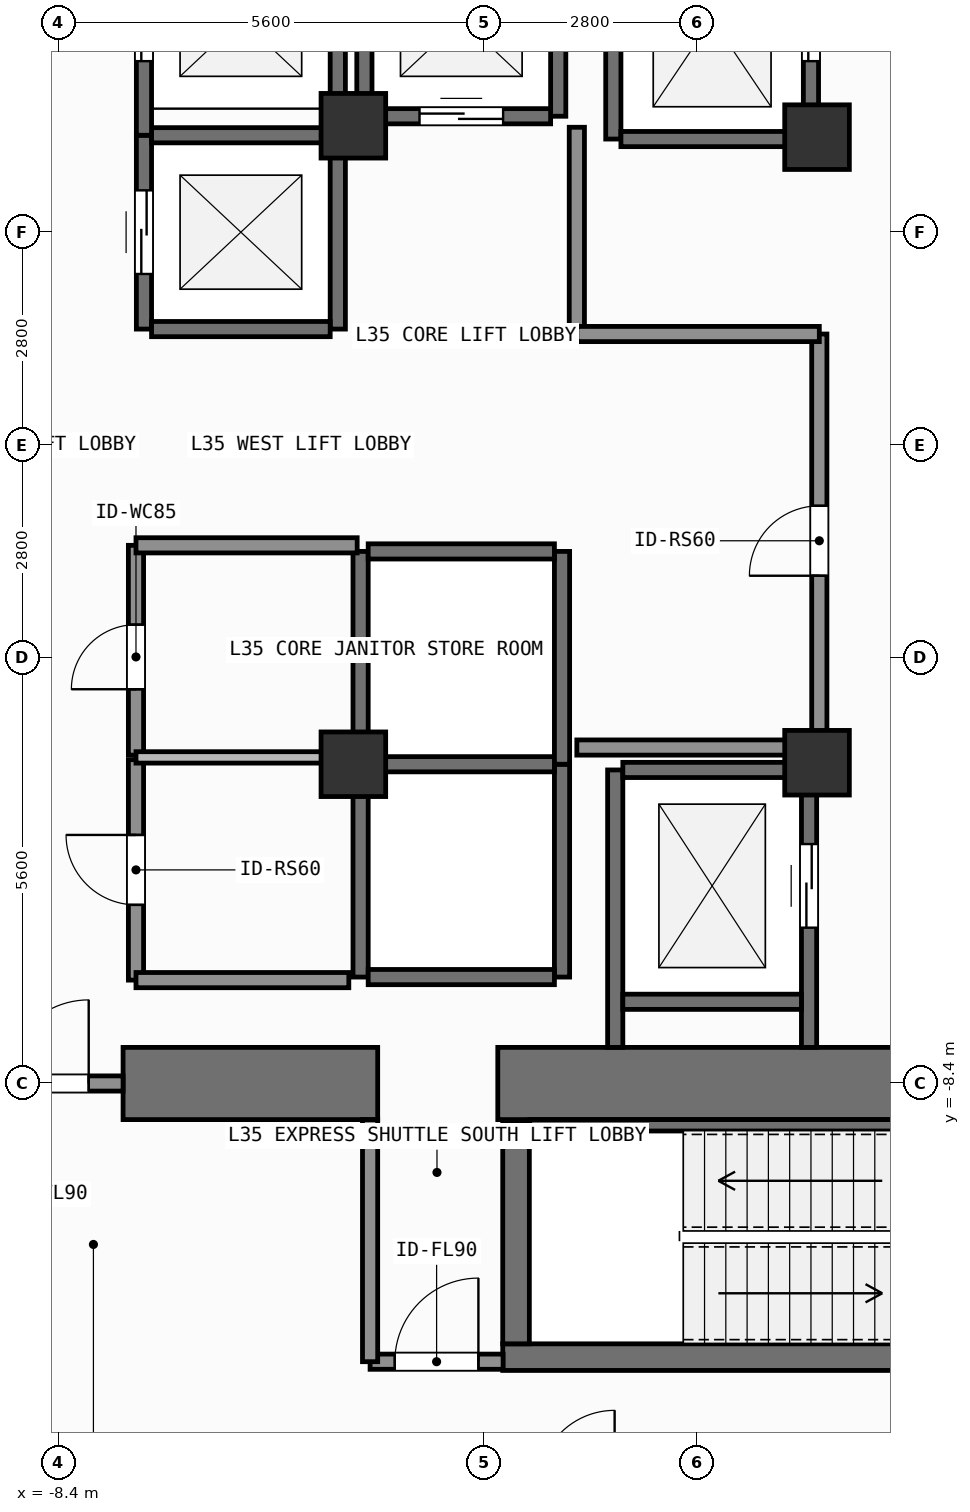
"""IFC4 building model, lengths in metres.
Left out: names, types, materials, properties, quantities, classifications, styles, units other than length and angle.
Written with IfcOpenShell. Run it as: python <this file> out.ifc"""

import sys

from ifc_helpers import new_model, si_unit, direction, frame, frame_2d, origin, origin_2d, place, context, subcontext, project, spatial, rectangle, extrude, element, fill, save


model = new_model("IFC4")
c1 = context("Model", 3, precision=1e-05, world=origin(), true_north=direction((0.0, 1.0)))
c2 = subcontext(c1, "Body", "Model", "MODEL_VIEW")
j1 = project(units=[si_unit("LENGTHUNIT", "METRE"), si_unit("PLANEANGLEUNIT", "RADIAN")], contexts=[c1])
p1 = place(None, origin())
s1 = spatial("IfcSite", under=j1, at=p1, CompositionType="ELEMENT")
p2 = place(p1, origin())
s2 = spatial("IfcBuilding", under=s1, at=p2, CompositionType="ELEMENT")
p3 = place(p2, frame((0.0, 0.0, 140.7)))
s3 = spatial("IfcBuildingStorey", under=s2, at=p3, CompositionType="ELEMENT", Elevation=140.7)
p4 = place(p3, frame((-7.55, -8.4, 0.0), z_axis=(0.0, 0.0, 1.0), x_axis=(1.0, 0.0, 0.0)))
e1 = element("IfcWall", 1, at=p4, inside=s3, PredefinedType="SHEAR", context=c2, shape_type="SweptSolid", body=[
    extrude(rectangle(XDim=3.35, YDim=0.95, at=frame_2d((1.675, 0.0))), origin(), (0.0, 0.0, 1.0), 3.9),
])
p5 = place(p3, frame((-2.62, -8.4, 0.0), z_axis=(0.0, 0.0, 1.0), x_axis=(1.0, 0.0, 0.0)))
e2 = element("IfcWall", 2, at=p5, inside=s3, PredefinedType="SHEAR", context=c2, shape_type="SweptSolid", body=[
    extrude(rectangle(XDim=7.27, YDim=0.95, at=frame_2d((3.635, 0.0))), origin(), (0.0, 0.0, 1.0), 3.9),
])
p6 = place(p3, frame((-2.555, -12.0, 0.0), z_axis=(0.0, 0.0, 1.0), x_axis=(1.0, 0.0, 0.0)))
e3 = element("IfcWall", 3, at=p6, inside=s3, PredefinedType="SHEAR", context=c2, shape_type="SweptSolid", body=[
    extrude(rectangle(XDim=7.31, YDim=0.35, at=frame_2d((3.655, 0.0))), origin(), (0.0, 0.0, 1.0), 3.9),
])
p7 = place(p3, frame((-2.2, -8.95, 0.0), z_axis=(0.0, 0.0, 1.0), x_axis=(1.0, 0.0, 0.0)))
e4 = element("IfcWall", 4, at=p7, inside=s3, PredefinedType="SHEAR", context=c2, shape_type="SweptSolid", body=[
    extrude(rectangle(XDim=6.6, YDim=0.15, at=frame_2d((3.3, 0.0))), origin(), (0.0, 0.0, 1.0), 3.9),
])
p8 = place(p3, frame((-2.38, -11.825, 0.0), z_axis=(0.0, 0.0, 1.0), x_axis=(0.0, 1.0, 0.0)))
e5 = element("IfcWall", 5, at=p8, inside=s3, PredefinedType="SHEAR", context=c2, shape_type="SweptSolid", body=[
    extrude(rectangle(XDim=2.925, YDim=0.35, at=frame_2d((1.462, 0.0))), origin(), (0.0, 0.0, 1.0), 3.9),
])
for number, where, z_axis, x_axis in (
    (6, (-4.52, -4.2, 0.0), (0.0, 0.0, 1.0), (1.0, 0.0, 0.0)),
    (7, (1.58, -4.18, 0.0), (0.0, 0.0, 1.0), (1.0, 0.0, 0.0)),
    (8, (1.58, 4.05, 0.0), (0.0, 0.0, 1.0), (1.0, 0.0, 0.0)),
    (9, (-4.52, 4.2, 0.0), (0.0, 0.0, 1.0), (1.0, 0.0, 0.0)),
):
    element("IfcColumn", number, at=place(p3, frame(where, z_axis=z_axis, x_axis=x_axis)), inside=s3, PredefinedType="COLUMN", context=c2, shape_type="SweptSolid", body=[
        extrude(rectangle(XDim=0.85, YDim=0.85, at=origin_2d()), origin(), (0.0, 0.0, 1.0), 3.9),
    ])
p9 = place(p3, frame((-7.275, 1.525, 0.0), z_axis=(0.0, 0.0, 1.0), x_axis=(0.0, 1.0, 0.0)))
e10 = element("IfcWall", 10, at=p9, inside=s3, PredefinedType="SHEAR", context=c2, shape_type="SweptSolid", body=[
    extrude(rectangle(XDim=2.55, YDim=0.2, at=frame_2d((1.275, 0.0))), origin(), (0.0, 0.0, 1.0), 3.68),
])
p10 = place(p9, frame((0.725, 0.0, 0.0)))
e11 = element("IfcOpeningElement", 11, at=p10, cuts=e10, PredefinedType="OPENING", context=c2, shape_type="SweptSolid", body=[
    extrude(rectangle(XDim=1.1, YDim=2.2, at=frame_2d((0.55, 1.1))), frame((0.0, 0.11, 0.0), z_axis=(0.0, -1.0, 0.0), x_axis=(1.0, 0.0, 0.0)), (0.0, 0.0, 1.0), 0.22),
])
p11 = place(p3, frame((-4.725, 1.525, 0.0), z_axis=(0.0, 0.0, 1.0), x_axis=(0.0, 1.0, 0.0)))
e12 = element("IfcWall", 12, at=p11, inside=s3, PredefinedType="SHEAR", context=c2, shape_type="SweptSolid", body=[
    extrude(rectangle(XDim=2.55, YDim=0.2, at=frame_2d((1.275, 0.0))), origin(), (0.0, 0.0, 1.0), 3.68),
])
for number, where, z_axis, x_axis in (
    (13, (-7.175, 1.525, 0.0), (0.0, 0.0, 1.0), (1.0, 0.0, 0.0)),
    (14, (-7.175, 4.075, 0.0), (0.0, 0.0, 1.0), (1.0, 0.0, 0.0)),
):
    element("IfcWall", number, at=place(p3, frame(where, z_axis=z_axis, x_axis=x_axis)), inside=s3, PredefinedType="SHEAR", context=c2, shape_type="SweptSolid", body=[
        extrude(rectangle(XDim=2.35, YDim=0.2, at=frame_2d((1.175, 0.0))), origin(), (0.0, 0.0, 1.0), 3.68),
    ])
p12 = place(p3, frame((-7.275, 4.075, 0.0), z_axis=(0.0, 0.0, 1.0), x_axis=(0.0, 1.0, 0.0)))
e15 = element("IfcWall", 15, at=p12, inside=s3, PredefinedType="SHEAR", context=c2, shape_type="SweptSolid", body=[
    extrude(rectangle(XDim=2.8, YDim=0.2, at=frame_2d((1.4, 0.0))), origin(), (0.0, 0.0, 1.0), 3.68),
])
p13 = place(p12, frame((0.975, 0.0, 0.0)))
e16 = element("IfcOpeningElement", 16, at=p13, cuts=e15, PredefinedType="OPENING", context=c2, shape_type="SweptSolid", body=[
    extrude(rectangle(XDim=1.1, YDim=2.2, at=frame_2d((0.55, 1.1))), frame((0.0, 0.11, 0.0), z_axis=(0.0, -1.0, 0.0), x_axis=(1.0, 0.0, 0.0)), (0.0, 0.0, 1.0), 0.22),
])
p14 = place(p3, frame((-4.725, 4.075, 0.0), z_axis=(0.0, 0.0, 1.0), x_axis=(0.0, 1.0, 0.0)))
e17 = element("IfcWall", 17, at=p14, inside=s3, PredefinedType="SHEAR", context=c2, shape_type="SweptSolid", body=[
    extrude(rectangle(XDim=2.8, YDim=0.2, at=frame_2d((1.4, 0.0))), origin(), (0.0, 0.0, 1.0), 3.68),
])
for number, where, z_axis, x_axis in (
    (18, (-4.375, 4.325, 0.0), (0.0, 0.0, 1.0), (0.0, 1.0, 0.0)),
    (19, (-1.825, 4.325, 0.0), (0.0, 0.0, 1.0), (0.0, 1.0, 0.0)),
):
    element("IfcWall", number, at=place(p3, frame(where, z_axis=z_axis, x_axis=x_axis)), inside=s3, PredefinedType="SHEAR", context=c2, shape_type="SweptSolid", body=[
        extrude(rectangle(XDim=2.55, YDim=0.2, at=frame_2d((1.275, 0.0))), origin(), (0.0, 0.0, 1.0), 3.68),
    ])
p15 = place(p3, frame((-4.275, 4.325, 0.0), z_axis=(0.0, 0.0, 1.0), x_axis=(1.0, 0.0, 0.0)))
e20 = element("IfcWall", 20, at=p15, inside=s3, PredefinedType="SHEAR", context=c2, shape_type="SweptSolid", body=[
    extrude(rectangle(XDim=2.35, YDim=0.2, at=frame_2d((1.175, 0.0))), origin(), (0.0, 0.0, 1.0), 3.68),
])
p16 = place(p15, frame((0.625, 0.0, 0.0)))
e21 = element("IfcOpeningElement", 21, at=p16, cuts=e20, PredefinedType="OPENING", context=c2, shape_type="SweptSolid", body=[
    extrude(rectangle(XDim=1.1, YDim=2.2, at=frame_2d((0.55, 1.1))), frame((0.0, 0.11, 0.0), z_axis=(0.0, -1.0, 0.0), x_axis=(1.0, 0.0, 0.0)), (0.0, 0.0, 1.0), 0.22),
])
for number, where, z_axis, x_axis in (
    (22, (-4.425, -7.0, 0.0), (0.0, 0.0, 1.0), (0.0, 1.0, 0.0)),
    (23, (-1.775, -7.0, 0.0), (0.0, 0.0, 1.0), (0.0, 1.0, 0.0)),
):
    element("IfcWall", number, at=place(p3, frame(where, z_axis=z_axis, x_axis=x_axis)), inside=s3, PredefinedType="SHEAR", context=c2, shape_type="SweptSolid", body=[
        extrude(rectangle(XDim=2.8, YDim=0.2, at=frame_2d((1.4, 0.0))), origin(), (0.0, 0.0, 1.0), 3.68),
    ])
for number, where, z_axis, x_axis in (
    (24, (-4.325, -7.0, 0.0), (0.0, 0.0, 1.0), (1.0, 0.0, 0.0)),
    (25, (-4.325, -4.2, 0.0), (0.0, 0.0, 1.0), (1.0, 0.0, 0.0)),
):
    element("IfcWall", number, at=place(p3, frame(where, z_axis=z_axis, x_axis=x_axis)), inside=s3, PredefinedType="SHEAR", context=c2, shape_type="SweptSolid", body=[
        extrude(rectangle(XDim=2.45, YDim=0.2, at=frame_2d((1.225, 0.0))), origin(), (0.0, 0.0, 1.0), 3.68),
    ])
for number, where, z_axis, x_axis in (
    (26, (-4.425, -4.2, 0.0), (0.0, 0.0, 1.0), (0.0, 1.0, 0.0)),
    (27, (-1.775, -4.2, 0.0), (0.0, 0.0, 1.0), (0.0, 1.0, 0.0)),
):
    element("IfcWall", number, at=place(p3, frame(where, z_axis=z_axis, x_axis=x_axis)), inside=s3, PredefinedType="SHEAR", context=c2, shape_type="SweptSolid", body=[
        extrude(rectangle(XDim=2.8, YDim=0.2, at=frame_2d((1.4, 0.0))), origin(), (0.0, 0.0, 1.0), 3.68),
    ])
p17 = place(p3, frame((-4.325, -1.4, 0.0), z_axis=(0.0, 0.0, 1.0), x_axis=(1.0, 0.0, 0.0)))
e28 = element("IfcWall", 28, at=p17, inside=s3, PredefinedType="SHEAR", context=c2, shape_type="SweptSolid", body=[
    extrude(rectangle(XDim=2.45, YDim=0.2, at=frame_2d((1.225, 0.0))), origin(), (0.0, 0.0, 1.0), 3.68),
])
p18 = place(p3, frame((-1.1, 4.025, 0.0), z_axis=(0.0, 0.0, 1.0), x_axis=(0.0, 1.0, 0.0)))
e29 = element("IfcWall", 29, at=p18, inside=s3, PredefinedType="SHEAR", context=c2, shape_type="SweptSolid", body=[
    extrude(rectangle(XDim=3.15, YDim=0.2, at=frame_2d((1.575, 0.0))), origin(), (0.0, 0.0, 1.0), 3.68),
])
p19 = place(p3, frame((1.5, 4.025, 0.0), z_axis=(0.0, 0.0, 1.0), x_axis=(0.0, 1.0, 0.0)))
e30 = element("IfcWall", 30, at=p19, inside=s3, PredefinedType="SHEAR", context=c2, shape_type="SweptSolid", body=[
    extrude(rectangle(XDim=3.15, YDim=0.2, at=frame_2d((1.575, 0.0))), origin(), (0.0, 0.0, 1.0), 3.68),
])
p20 = place(p19, frame((1.025, 0.0, 0.0)))
e31 = element("IfcOpeningElement", 31, at=p20, cuts=e30, PredefinedType="OPENING", context=c2, shape_type="SweptSolid", body=[
    extrude(rectangle(XDim=1.1, YDim=2.2, at=frame_2d((0.55, 1.1))), frame((0.0, 0.11, 0.0), z_axis=(0.0, -1.0, 0.0), x_axis=(1.0, 0.0, 0.0)), (0.0, 0.0, 1.0), 0.22),
])
p21 = place(p3, frame((-1.0, 4.025, 0.0), z_axis=(0.0, 0.0, 1.0), x_axis=(1.0, 0.0, 0.0)))
e32 = element("IfcWall", 32, at=p21, inside=s3, PredefinedType="SHEAR", context=c2, shape_type="SweptSolid", body=[
    extrude(rectangle(XDim=2.4, YDim=0.2, at=frame_2d((1.2, 0.0))), origin(), (0.0, 0.0, 1.0), 3.68),
])
p22 = place(p3, frame((-1.075, -7.925, 0.0), z_axis=(0.0, 0.0, 1.0), x_axis=(0.0, 1.0, 0.0)))
e33 = element("IfcWall", 33, at=p22, inside=s3, PredefinedType="SHEAR", context=c2, shape_type="SweptSolid", body=[
    extrude(rectangle(XDim=3.65, YDim=0.2, at=frame_2d((1.825, 0.0))), origin(), (0.0, 0.0, 1.0), 3.68),
])
p23 = place(p3, frame((1.475, -7.925, 0.0), z_axis=(0.0, 0.0, 1.0), x_axis=(0.0, 1.0, 0.0)))
e34 = element("IfcWall", 34, at=p23, inside=s3, PredefinedType="SHEAR", context=c2, shape_type="SweptSolid", body=[
    extrude(rectangle(XDim=3.65, YDim=0.2, at=frame_2d((1.825, 0.0))), origin(), (0.0, 0.0, 1.0), 3.68),
])
p24 = place(p23, frame((1.575, 0.0, 0.0)))
e35 = element("IfcOpeningElement", 35, at=p24, cuts=e34, PredefinedType="OPENING", context=c2, shape_type="SweptSolid", body=[
    extrude(rectangle(XDim=1.1, YDim=2.2, at=frame_2d((0.55, 1.1))), frame((0.0, 0.11, 0.0), z_axis=(0.0, -1.0, 0.0), x_axis=(1.0, 0.0, 0.0)), (0.0, 0.0, 1.0), 0.22),
])
for number, where, z_axis, x_axis in (
    (36, (-0.975, -7.325, 0.0), (0.0, 0.0, 1.0), (1.0, 0.0, 0.0)),
    (37, (-0.975, -4.275, 0.0), (0.0, 0.0, 1.0), (1.0, 0.0, 0.0)),
):
    element("IfcWall", number, at=place(p3, frame(where, z_axis=z_axis, x_axis=x_axis)), inside=s3, PredefinedType="SHEAR", context=c2, shape_type="SweptSolid", body=[
        extrude(rectangle(XDim=2.35, YDim=0.2, at=frame_2d((1.175, 0.0))), origin(), (0.0, 0.0, 1.0), 3.68),
    ])
p25 = place(p3, frame((-9.7, -8.4, 0.0), z_axis=(0.0, 0.0, 1.0), x_axis=(1.0, 0.0, 0.0)))
e38 = element("IfcWall", 38, at=p25, inside=s3, PredefinedType="SOLIDWALL", context=c2, shape_type="SweptSolid", body=[
    extrude(rectangle(XDim=2.15, YDim=0.2, at=frame_2d((1.075, 0.0))), origin(), (0.0, 0.0, 1.0), 2.72),
])
p26 = place(p25, frame((0.598, 0.0, 0.0)))
e39 = element("IfcOpeningElement", 39, at=p26, cuts=e38, PredefinedType="OPENING", context=c2, shape_type="SweptSolid", body=[
    extrude(rectangle(XDim=1.1, YDim=2.15, at=frame_2d((0.55, 1.075))), frame((0.0, 0.11, 0.0), z_axis=(0.0, -1.0, 0.0), x_axis=(1.0, 0.0, 0.0)), (0.0, 0.0, 1.0), 0.22),
])
p27 = place(p3, frame((-4.3, -12.06, 0.0), z_axis=(0.0, 0.0, 1.0), x_axis=(1.0, 0.0, 0.0)))
e40 = element("IfcWall", 40, at=p27, inside=s3, PredefinedType="SOLIDWALL", context=c2, shape_type="SweptSolid", body=[
    extrude(rectangle(XDim=1.75, YDim=0.2, at=frame_2d((0.875, 0.0))), origin(), (0.0, 0.0, 1.0), 3.68),
])
p28 = place(p27, frame((0.325, 0.0, 0.0)))
e41 = element("IfcOpeningElement", 41, at=p28, cuts=e40, PredefinedType="OPENING", context=c2, shape_type="SweptSolid", body=[
    extrude(rectangle(XDim=1.1, YDim=2.15, at=frame_2d((0.55, 1.075))), frame((0.0, 0.11, 0.0), z_axis=(0.0, -1.0, 0.0), x_axis=(1.0, 0.0, 0.0)), (0.0, 0.0, 1.0), 0.22),
])
p29 = place(p3, frame((1.61, -3.98, 0.0), z_axis=(0.0, 0.0, 1.0), x_axis=(0.0, 1.0, 0.0)))
e42 = element("IfcWall", 42, at=p29, inside=s3, PredefinedType="SOLIDWALL", context=c2, shape_type="SweptSolid", body=[
    extrude(rectangle(XDim=5.44, YDim=0.2, at=frame_2d((2.72, 0.0))), origin(), (0.0, 0.0, 1.0), 3.68),
])
p30 = place(p29, frame((2.26, 0.0, 0.0)))
e43 = element("IfcOpeningElement", 43, at=p30, cuts=e42, PredefinedType="OPENING", context=c2, shape_type="SweptSolid", body=[
    extrude(rectangle(XDim=0.92, YDim=2.1, at=frame_2d((0.46, 1.05))), frame((0.0, 0.11, 0.0), z_axis=(0.0, -1.0, 0.0), x_axis=(1.0, 0.0, 0.0)), (0.0, 0.0, 1.0), 0.22),
])
p31 = place(p3, frame((-7.38, -7.04, 0.0), z_axis=(0.0, 0.0, 1.0), x_axis=(0.0, 1.0, 0.0)))
e44 = element("IfcWall", 44, at=p31, inside=s3, PredefinedType="SOLIDWALL", context=c2, shape_type="SweptSolid", body=[
    extrude(rectangle(XDim=2.9, YDim=0.2, at=frame_2d((1.45, 0.0))), origin(), (0.0, 0.0, 1.0), 3.68),
])
p32 = place(p31, frame((0.99, 0.0, 0.0)))
e45 = element("IfcOpeningElement", 45, at=p32, cuts=e44, PredefinedType="OPENING", context=c2, shape_type="SweptSolid", body=[
    extrude(rectangle(XDim=0.92, YDim=2.1, at=frame_2d((0.46, 1.05))), frame((0.0, 0.11, 0.0), z_axis=(0.0, -1.0, 0.0), x_axis=(1.0, 0.0, 0.0)), (0.0, 0.0, 1.0), 0.22),
])
p33 = place(p3, frame((-7.38, -4.08, 0.0), z_axis=(0.0, 0.0, 1.0), x_axis=(0.0, 1.0, 0.0)))
e46 = element("IfcWall", 46, at=p33, inside=s3, PredefinedType="SOLIDWALL", context=c2, shape_type="SweptSolid", body=[
    extrude(rectangle(XDim=2.76, YDim=0.2, at=frame_2d((1.38, 0.0))), origin(), (0.0, 0.0, 1.0), 3.68),
])
p34 = place(p33, frame((0.867, 0.0, 0.0)))
e47 = element("IfcOpeningElement", 47, at=p34, cuts=e46, PredefinedType="OPENING", context=c2, shape_type="SweptSolid", body=[
    extrude(rectangle(XDim=0.85, YDim=2.1, at=frame_2d((0.425, 1.05))), frame((0.0, 0.11, 0.0), z_axis=(0.0, -1.0, 0.0), x_axis=(1.0, 0.0, 0.0)), (0.0, 0.0, 1.0), 0.22),
])
p35 = place(p3, frame((-4.3, -12.06, 0.0), z_axis=(0.0, 0.0, 1.0), x_axis=(0.0, 1.0, 0.0)))
e48 = element("IfcWall", 48, at=p35, inside=s3, PredefinedType="SOLIDWALL", context=c2, shape_type="SweptSolid", body=[
    extrude(rectangle(XDim=3.185, YDim=0.2, at=frame_2d((1.593, 0.0))), origin(), (0.0, 0.0, 1.0), 3.68),
])
p36 = place(p3, frame((-7.38, -1.32, 0.0), z_axis=(0.0, 0.0, 1.0), x_axis=(1.0, 0.0, 0.0)))
e49 = element("IfcWall", 49, at=p36, inside=s3, PredefinedType="SOLIDWALL", context=c2, shape_type="SweptSolid", body=[
    extrude(rectangle(XDim=2.91, YDim=0.2, at=frame_2d((1.455, 0.0))), origin(), (0.0, 0.0, 1.0), 3.68),
])
p37 = place(p3, frame((-1.58, 1.48, 0.0), z_axis=(0.0, 0.0, 1.0), x_axis=(0.0, 1.0, 0.0)))
e50 = element("IfcWall", 50, at=p37, inside=s3, PredefinedType="SOLIDWALL", context=c2, shape_type="SweptSolid", body=[
    extrude(rectangle(XDim=2.7, YDim=0.2, at=frame_2d((1.35, 0.0))), origin(), (0.0, 0.0, 1.0), 3.68),
])
for number, where, z_axis, x_axis in (
    (51, (-1.58, -3.98, 0.0), (0.0, 0.0, 1.0), (1.0, 0.0, 0.0)),
    (52, (-1.58, 1.46, 0.0), (0.0, 0.0, 1.0), (1.0, 0.0, 0.0)),
):
    element("IfcWall", number, at=place(p3, frame(where, z_axis=z_axis, x_axis=x_axis)), inside=s3, PredefinedType="SOLIDWALL", context=c2, shape_type="SweptSolid", body=[
        extrude(rectangle(XDim=3.19, YDim=0.2, at=frame_2d((1.595, 0.0))), origin(), (0.0, 0.0, 1.0), 3.68),
    ])
p38 = place(p3, frame((-7.38, -7.04, 0.0), z_axis=(0.0, 0.0, 1.0), x_axis=(1.0, 0.0, 0.0)))
e53 = element("IfcWall", 53, at=p38, inside=s3, PredefinedType="SOLIDWALL", context=c2, shape_type="SweptSolid", body=[
    extrude(rectangle(XDim=2.8, YDim=0.2, at=frame_2d((1.4, 0.0))), origin(), (0.0, 0.0, 1.0), 3.68),
])
p39 = place(p3, frame((-7.38, -4.11, 0.0), z_axis=(0.0, 0.0, 1.0), x_axis=(1.0, 0.0, 0.0)))
e54 = element("IfcWall", 54, at=p39, inside=s3, PredefinedType="PARTITIONING", context=c2, shape_type="SweptSolid", body=[
    extrude(rectangle(XDim=2.8, YDim=0.15, at=frame_2d((1.4, 0.0))), origin(), (0.0, 0.0, 1.0), 3.68),
])
p40 = place(p10, origin())
e55 = element("IfcDoor", 55, at=p40, inside=s3, OperationType="SLIDING_TO_LEFT", PredefinedType="DOOR", context=c2, shape_type="SweptSolid", body=[
    extrude(rectangle(XDim=1.1, YDim=2.2, at=frame_2d((0.55, 1.1))), frame((0.0, 0.025, 0.0), z_axis=(0.0, -1.0, 0.0), x_axis=(1.0, 0.0, 0.0)), (0.0, 0.0, 1.0), 0.05),
])
fill(e11, e55)
p41 = place(p13, origin())
e56 = element("IfcDoor", 56, at=p41, inside=s3, OperationType="SLIDING_TO_LEFT", PredefinedType="DOOR", context=c2, shape_type="SweptSolid", body=[
    extrude(rectangle(XDim=1.1, YDim=2.2, at=frame_2d((0.55, 1.1))), frame((0.0, 0.025, 0.0), z_axis=(0.0, -1.0, 0.0), x_axis=(1.0, 0.0, 0.0)), (0.0, 0.0, 1.0), 0.05),
])
fill(e16, e56)
p42 = place(p16, origin())
e57 = element("IfcDoor", 57, at=p42, inside=s3, OperationType="SLIDING_TO_LEFT", PredefinedType="DOOR", context=c2, shape_type="SweptSolid", body=[
    extrude(rectangle(XDim=1.1, YDim=2.2, at=frame_2d((0.55, 1.1))), frame((0.0, 0.025, 0.0), z_axis=(0.0, -1.0, 0.0), x_axis=(1.0, 0.0, 0.0)), (0.0, 0.0, 1.0), 0.05),
])
fill(e21, e57)
p43 = place(p20, origin())
e58 = element("IfcDoor", 58, at=p43, inside=s3, OperationType="SLIDING_TO_LEFT", PredefinedType="DOOR", context=c2, shape_type="SweptSolid", body=[
    extrude(rectangle(XDim=1.1, YDim=2.2, at=frame_2d((0.55, 1.1))), frame((0.0, 0.025, 0.0), z_axis=(0.0, -1.0, 0.0), x_axis=(1.0, 0.0, 0.0)), (0.0, 0.0, 1.0), 0.05),
])
fill(e31, e58)
p44 = place(p24, origin())
e59 = element("IfcDoor", 59, at=p44, inside=s3, OperationType="SLIDING_TO_LEFT", PredefinedType="DOOR", context=c2, shape_type="SweptSolid", body=[
    extrude(rectangle(XDim=1.1, YDim=2.2, at=frame_2d((0.55, 1.1))), frame((0.0, 0.025, 0.0), z_axis=(0.0, -1.0, 0.0), x_axis=(1.0, 0.0, 0.0)), (0.0, 0.0, 1.0), 0.05),
])
fill(e35, e59)
p45 = place(p26, origin())
e60 = element("IfcDoor", 60, at=p45, inside=s3, OperationType="SINGLE_SWING_RIGHT", PredefinedType="DOOR", context=c2, shape_type="SweptSolid", body=[
    extrude(rectangle(XDim=1.1, YDim=2.15, at=frame_2d((0.55, 1.075))), frame((0.0, 0.025, 0.0), z_axis=(0.0, -1.0, 0.0), x_axis=(1.0, 0.0, 0.0)), (0.0, 0.0, 1.0), 0.05),
])
fill(e39, e60)
p46 = place(p28, origin())
e61 = element("IfcDoor", 61, at=p46, inside=s3, OperationType="SINGLE_SWING_RIGHT", PredefinedType="DOOR", context=c2, shape_type="SweptSolid", body=[
    extrude(rectangle(XDim=1.1, YDim=2.15, at=frame_2d((0.55, 1.075))), frame((0.0, 0.025, 0.0), z_axis=(0.0, -1.0, 0.0), x_axis=(1.0, 0.0, 0.0)), (0.0, 0.0, 1.0), 0.05),
])
fill(e41, e61)
p47 = place(p30, origin())
e62 = element("IfcDoor", 62, at=p47, inside=s3, OperationType="SINGLE_SWING_LEFT", PredefinedType="DOOR", context=c2, shape_type="SweptSolid", body=[
    extrude(rectangle(XDim=0.92, YDim=2.1, at=frame_2d((0.46, 1.05))), frame((0.0, 0.025, 0.0), z_axis=(0.0, -1.0, 0.0), x_axis=(1.0, 0.0, 0.0)), (0.0, 0.0, 1.0), 0.05),
])
fill(e43, e62)
p48 = place(p32, origin())
e63 = element("IfcDoor", 63, at=p48, inside=s3, OperationType="SINGLE_SWING_RIGHT", PredefinedType="DOOR", context=c2, shape_type="SweptSolid", body=[
    extrude(rectangle(XDim=0.92, YDim=2.1, at=frame_2d((0.46, 1.05))), frame((0.0, 0.025, 0.0), z_axis=(0.0, -1.0, 0.0), x_axis=(1.0, 0.0, 0.0)), (0.0, 0.0, 1.0), 0.05),
])
fill(e45, e63)
p49 = place(p34, origin())
e64 = element("IfcDoor", 64, at=p49, inside=s3, OperationType="SINGLE_SWING_LEFT", PredefinedType="DOOR", context=c2, shape_type="SweptSolid", body=[
    extrude(rectangle(XDim=0.85, YDim=2.1, at=frame_2d((0.425, 1.05))), frame((0.0, 0.025, 0.0), z_axis=(0.0, -1.0, 0.0), x_axis=(1.0, 0.0, 0.0)), (0.0, 0.0, 1.0), 0.05),
])
fill(e47, e64)
save(model, sys.argv[1])
